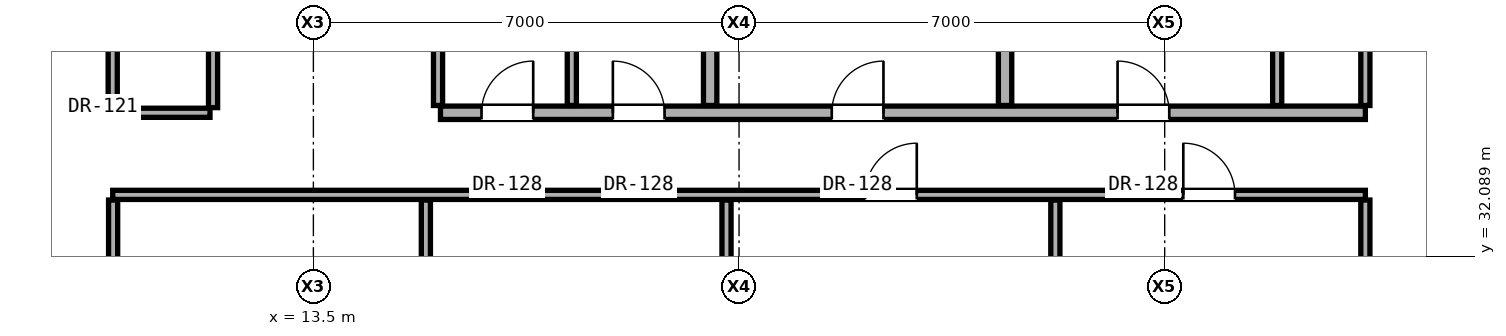
"""IFC4 building model, lengths in metres.
Left out: names, types, materials, properties, quantities, classifications, styles, units other than length and angle.
Written with IfcOpenShell. Run it as: python <this file> out.ifc"""

import sys

from ifc_helpers import new_model, si_unit, direction, frame, frame_2d, origin, place, context, subcontext, project, spatial, rectangle, extrude, element, fill, save


model = new_model("IFC4")
c1 = context("Model", 3, precision=1e-05, world=origin(), true_north=direction((0.0, 1.0)))
c2 = subcontext(c1, "Body", "Model", "MODEL_VIEW")
j1 = project(units=[si_unit("LENGTHUNIT", "METRE"), si_unit("PLANEANGLEUNIT", "RADIAN")], contexts=[c1])
p1 = place(None, origin())
s1 = spatial("IfcSite", under=j1, at=p1, CompositionType="ELEMENT")
p2 = place(p1, origin())
s2 = spatial("IfcBuilding", under=s1, at=p2, CompositionType="ELEMENT")
p3 = place(p2, frame((0.0, 0.0, 71.9)))
s3 = spatial("IfcBuildingStorey", under=s2, at=p3, CompositionType="ELEMENT", Elevation=71.9)
p4 = place(p3, frame((10.2, 33.1, 0.0), z_axis=(0.0, 0.0, 1.0), x_axis=(1.0, 0.0, 0.0)))
e1 = element("IfcWall", 1, at=p4, inside=s3, PredefinedType="PARTITIONING", context=c2, shape_type="SweptSolid", body=[
    extrude(rectangle(XDim=20.6, YDim=0.15, at=frame_2d((10.3, 0.0))), origin(), (0.0, 0.0, 1.0), 2.104),
])
p5 = place(p4, frame((12.373, 0.0, 0.0)))
e2 = element("IfcOpeningElement", 2, at=p5, cuts=e1, PredefinedType="OPENING", context=c2, shape_type="SweptSolid", body=[
    extrude(rectangle(XDim=0.85, YDim=2.01, at=frame_2d((0.425, 1.005))), frame((0.0, 0.085, 0.0), z_axis=(0.0, -1.0, 0.0), x_axis=(1.0, 0.0, 0.0)), (0.0, 0.0, 1.0), 0.17),
])
p6 = place(p4, frame((17.606, 0.0, 0.0)))
e3 = element("IfcOpeningElement", 3, at=p6, cuts=e1, PredefinedType="OPENING", context=c2, shape_type="SweptSolid", body=[
    extrude(rectangle(XDim=0.85, YDim=2.01, at=frame_2d((0.425, 1.005))), frame((0.0, 0.085, 0.0), z_axis=(0.0, -1.0, 0.0), x_axis=(1.0, 0.0, 0.0)), (0.0, 0.0, 1.0), 0.17),
])
p7 = place(p3, frame((10.2, 34.45, 0.0), z_axis=(0.0, 0.0, 1.0), x_axis=(1.0, 0.0, 0.0)))
e4 = element("IfcWall", 4, at=p7, inside=s3, PredefinedType="PARTITIONING", context=c2, shape_type="SweptSolid", body=[
    extrude(rectangle(XDim=1.6, YDim=0.15, at=frame_2d((0.8, 0.0))), origin(), (0.0, 0.0, 1.0), 2.104),
])
p8 = place(p3, frame((15.59, 34.45, 0.0), z_axis=(0.0, 0.0, 1.0), x_axis=(1.0, 0.0, 0.0)))
e5 = element("IfcWall", 5, at=p8, inside=s3, PredefinedType="SOLIDWALL", context=c2, shape_type="SweptSolid", body=[
    extrude(rectangle(XDim=15.21, YDim=0.22, at=frame_2d((7.605, 0.0))), origin(), (0.0, 0.0, 1.0), 2.104),
])
p9 = place(p8, frame((6.435, 0.0, 0.0)))
e6 = element("IfcOpeningElement", 6, at=p9, cuts=e5, PredefinedType="OPENING", context=c2, shape_type="SweptSolid", body=[
    extrude(rectangle(XDim=0.85, YDim=2.01, at=frame_2d((0.425, 1.005))), frame((0.0, 0.12, 0.0), z_axis=(0.0, -1.0, 0.0), x_axis=(1.0, 0.0, 0.0)), (0.0, 0.0, 1.0), 0.24),
])
p10 = place(p8, frame((11.135, 0.0, 0.0)))
e7 = element("IfcOpeningElement", 7, at=p10, cuts=e5, PredefinedType="OPENING", context=c2, shape_type="SweptSolid", body=[
    extrude(rectangle(XDim=0.85, YDim=2.01, at=frame_2d((0.425, 1.005))), frame((0.0, 0.12, 0.0), z_axis=(0.0, -1.0, 0.0), x_axis=(1.0, 0.0, 0.0)), (0.0, 0.0, 1.0), 0.24),
])
p11 = place(p8, frame((0.675, 0.0, 0.0)))
e8 = element("IfcOpeningElement", 8, at=p11, cuts=e5, PredefinedType="OPENING", context=c2, shape_type="SweptSolid", body=[
    extrude(rectangle(XDim=0.85, YDim=2.01, at=frame_2d((0.425, 1.005))), frame((0.0, 0.12, 0.0), z_axis=(0.0, -1.0, 0.0), x_axis=(1.0, 0.0, 0.0)), (0.0, 0.0, 1.0), 0.24),
])
p12 = place(p8, frame((2.835, 0.0, 0.0)))
e9 = element("IfcOpeningElement", 9, at=p12, cuts=e5, PredefinedType="OPENING", context=c2, shape_type="SweptSolid", body=[
    extrude(rectangle(XDim=0.85, YDim=2.01, at=frame_2d((0.425, 1.005))), frame((0.0, 0.12, 0.0), z_axis=(0.0, -1.0, 0.0), x_axis=(1.0, 0.0, 0.0)), (0.0, 0.0, 1.0), 0.24),
])
p13 = place(p3, frame((10.207, 22.935, 0.0), z_axis=(0.0, 0.0, 1.0), x_axis=(0.0, 1.0, 0.0)))
e10 = element("IfcWall", 10, at=p13, inside=s3, PredefinedType="PARTITIONING", context=c2, shape_type="SweptSolid", body=[
    extrude(rectangle(XDim=10.08, YDim=0.15, at=frame_2d((5.04, 0.0))), origin(), (0.0, 0.0, 1.0), 2.279),
])
p14 = place(p13, frame((4.565, 0.0, 0.0)))
e11 = element("IfcOpeningElement", 11, at=p14, cuts=e10, PredefinedType="OPENING", context=c2, shape_type="SweptSolid", body=[
    extrude(rectangle(XDim=0.95, YDim=2.15, at=frame_2d((0.475, 1.075))), frame((0.0, 0.085, 0.0), z_axis=(0.0, -1.0, 0.0), x_axis=(1.0, 0.0, 0.0)), (0.0, 0.0, 1.0), 0.17),
])
p15 = place(p3, frame((10.2, 34.535, 0.0), z_axis=(0.0, 0.0, 1.0), x_axis=(0.0, 1.0, 0.0)))
e12 = element("IfcWall", 12, at=p15, inside=s3, PredefinedType="PARTITIONING", context=c2, shape_type="SweptSolid", body=[
    extrude(rectangle(XDim=9.13, YDim=0.15, at=frame_2d((4.565, 0.0))), origin(), (0.0, 0.0, 1.0), 2.436),
])
p16 = place(p3, frame((11.85, 34.535, 0.0), z_axis=(0.0, 0.0, 1.0), x_axis=(0.0, 1.0, 0.0)))
e13 = element("IfcWall", 13, at=p16, inside=s3, PredefinedType="PARTITIONING", context=c2, shape_type="SweptSolid", body=[
    extrude(rectangle(XDim=2.745, YDim=0.15, at=frame_2d((1.373, 0.0))), origin(), (0.0, 0.0, 1.0), 3.06),
])
p17 = place(p3, frame((15.35, 22.935, 0.0), z_axis=(0.0, 0.0, 1.0), x_axis=(0.0, 1.0, 0.0)))
e14 = element("IfcWall", 14, at=p17, inside=s3, PredefinedType="PARTITIONING", context=c2, shape_type="SweptSolid", body=[
    extrude(rectangle(XDim=10.08, YDim=0.15, at=frame_2d((5.04, 0.0))), origin(), (0.0, 0.0, 1.0), 2.104),
])
p18 = place(p3, frame((15.55, 34.57, 0.0), z_axis=(0.0, 0.0, 1.0), x_axis=(0.0, 1.0, 0.0)))
e15 = element("IfcWall", 15, at=p18, inside=s3, PredefinedType="PARTITIONING", context=c2, shape_type="SweptSolid", body=[
    extrude(rectangle(XDim=2.71, YDim=0.15, at=frame_2d((1.355, 0.0))), origin(), (0.0, 0.0, 1.0), 2.589),
])
p19 = place(p3, frame((17.75, 34.57, 0.0), z_axis=(0.0, 0.0, 1.0), x_axis=(0.0, 1.0, 0.0)))
e16 = element("IfcWall", 16, at=p19, inside=s3, PredefinedType="PARTITIONING", context=c2, shape_type="SweptSolid", body=[
    extrude(rectangle(XDim=2.71, YDim=0.15, at=frame_2d((1.355, 0.0))), origin(), (0.0, 0.0, 1.0), 3.06),
])
p20 = place(p3, frame((20.025, 34.57, 0.0), z_axis=(0.0, 0.0, 1.0), x_axis=(0.0, 1.0, 0.0)))
e17 = element("IfcWall", 17, at=p20, inside=s3, PredefinedType="SOLIDWALL", context=c2, shape_type="SweptSolid", body=[
    extrude(rectangle(XDim=2.71, YDim=0.22, at=frame_2d((1.355, 0.0))), origin(), (0.0, 0.0, 1.0), 3.06),
])
p21 = place(p3, frame((20.294, 19.985, 0.0), z_axis=(0.0, 0.0, 1.0), x_axis=(0.0, 1.0, 0.0)))
e18 = element("IfcWall", 18, at=p21, inside=s3, PredefinedType="PARTITIONING", context=c2, shape_type="SweptSolid", body=[
    extrude(rectangle(XDim=13.03, YDim=0.15, at=frame_2d((6.515, 0.0))), origin(), (0.0, 0.0, 1.0), 2.104),
])
p22 = place(p3, frame((24.875, 34.57, 0.0), z_axis=(0.0, 0.0, 1.0), x_axis=(0.0, 1.0, 0.0)))
e19 = element("IfcWall", 19, at=p22, inside=s3, PredefinedType="SOLIDWALL", context=c2, shape_type="SweptSolid", body=[
    extrude(rectangle(XDim=2.71, YDim=0.22, at=frame_2d((1.355, 0.0))), origin(), (0.0, 0.0, 1.0), 3.06),
])
p23 = place(p3, frame((25.702, 19.985, 0.0), z_axis=(0.0, 0.0, 1.0), x_axis=(0.0, 1.0, 0.0)))
e20 = element("IfcWall", 20, at=p23, inside=s3, PredefinedType="PARTITIONING", context=c2, shape_type="SweptSolid", body=[
    extrude(rectangle(XDim=13.03, YDim=0.15, at=frame_2d((6.515, 0.0))), origin(), (0.0, 0.0, 1.0), 2.104),
])
p24 = place(p3, frame((29.35, 34.57, 0.0), z_axis=(0.0, 0.0, 1.0), x_axis=(0.0, 1.0, 0.0)))
e21 = element("IfcWall", 21, at=p24, inside=s3, PredefinedType="PARTITIONING", context=c2, shape_type="SweptSolid", body=[
    extrude(rectangle(XDim=2.71, YDim=0.15, at=frame_2d((1.355, 0.0))), origin(), (0.0, 0.0, 1.0), 3.06),
])
p25 = place(p3, frame((30.8, 19.985, 0.0), z_axis=(0.0, 0.0, 1.0), x_axis=(0.0, 1.0, 0.0)))
e22 = element("IfcWall", 22, at=p25, inside=s3, PredefinedType="PARTITIONING", context=c2, shape_type="SweptSolid", body=[
    extrude(rectangle(XDim=13.03, YDim=0.15, at=frame_2d((6.515, 0.0))), origin(), (0.0, 0.0, 1.0), 2.279),
])
p26 = place(p3, frame((30.8, 34.57, 0.0), z_axis=(0.0, 0.0, 1.0), x_axis=(0.0, 1.0, 0.0)))
e23 = element("IfcWall", 23, at=p26, inside=s3, PredefinedType="PARTITIONING", context=c2, shape_type="SweptSolid", body=[
    extrude(rectangle(XDim=9.095, YDim=0.15, at=frame_2d((4.547, 0.0))), origin(), (0.0, 0.0, 1.0), 2.436),
])
p27 = place(p9, origin())
e24 = element("IfcDoor", 24, at=p27, inside=s3, OperationType="SINGLE_SWING_RIGHT", PredefinedType="DOOR", context=c2, shape_type="SweptSolid", body=[
    extrude(rectangle(XDim=0.85, YDim=2.01, at=frame_2d((0.425, 1.005))), frame((0.0, 0.025, 0.0), z_axis=(0.0, -1.0, 0.0), x_axis=(1.0, 0.0, 0.0)), (0.0, 0.0, 1.0), 0.05),
])
fill(e6, e24)
p28 = place(p10, origin())
e25 = element("IfcDoor", 25, at=p28, inside=s3, OperationType="SINGLE_SWING_LEFT", PredefinedType="DOOR", context=c2, shape_type="SweptSolid", body=[
    extrude(rectangle(XDim=0.85, YDim=2.01, at=frame_2d((0.425, 1.005))), frame((0.0, 0.025, 0.0), z_axis=(0.0, -1.0, 0.0), x_axis=(1.0, 0.0, 0.0)), (0.0, 0.0, 1.0), 0.05),
])
fill(e7, e25)
p29 = place(p11, origin())
e26 = element("IfcDoor", 26, at=p29, inside=s3, OperationType="SINGLE_SWING_RIGHT", PredefinedType="DOOR", context=c2, shape_type="SweptSolid", body=[
    extrude(rectangle(XDim=0.85, YDim=2.01, at=frame_2d((0.425, 1.005))), frame((0.0, 0.025, 0.0), z_axis=(0.0, -1.0, 0.0), x_axis=(1.0, 0.0, 0.0)), (0.0, 0.0, 1.0), 0.05),
])
fill(e8, e26)
p30 = place(p12, origin())
e27 = element("IfcDoor", 27, at=p30, inside=s3, OperationType="SINGLE_SWING_LEFT", PredefinedType="DOOR", context=c2, shape_type="SweptSolid", body=[
    extrude(rectangle(XDim=0.85, YDim=2.01, at=frame_2d((0.425, 1.005))), frame((0.0, 0.025, 0.0), z_axis=(0.0, -1.0, 0.0), x_axis=(1.0, 0.0, 0.0)), (0.0, 0.0, 1.0), 0.05),
])
fill(e9, e27)
p31 = place(p5, origin())
e28 = element("IfcDoor", 28, at=p31, inside=s3, OperationType="SINGLE_SWING_RIGHT", PredefinedType="DOOR", context=c2, shape_type="SweptSolid", body=[
    extrude(rectangle(XDim=0.85, YDim=2.01, at=frame_2d((0.425, 1.005))), frame((0.0, 0.025, 0.0), z_axis=(0.0, -1.0, 0.0), x_axis=(1.0, 0.0, 0.0)), (0.0, 0.0, 1.0), 0.05),
])
fill(e2, e28)
p32 = place(p6, origin())
e29 = element("IfcDoor", 29, at=p32, inside=s3, OperationType="SINGLE_SWING_LEFT", PredefinedType="DOOR", context=c2, shape_type="SweptSolid", body=[
    extrude(rectangle(XDim=0.85, YDim=2.01, at=frame_2d((0.425, 1.005))), frame((0.0, 0.025, 0.0), z_axis=(0.0, -1.0, 0.0), x_axis=(1.0, 0.0, 0.0)), (0.0, 0.0, 1.0), 0.05),
])
fill(e3, e29)
save(model, sys.argv[1])
